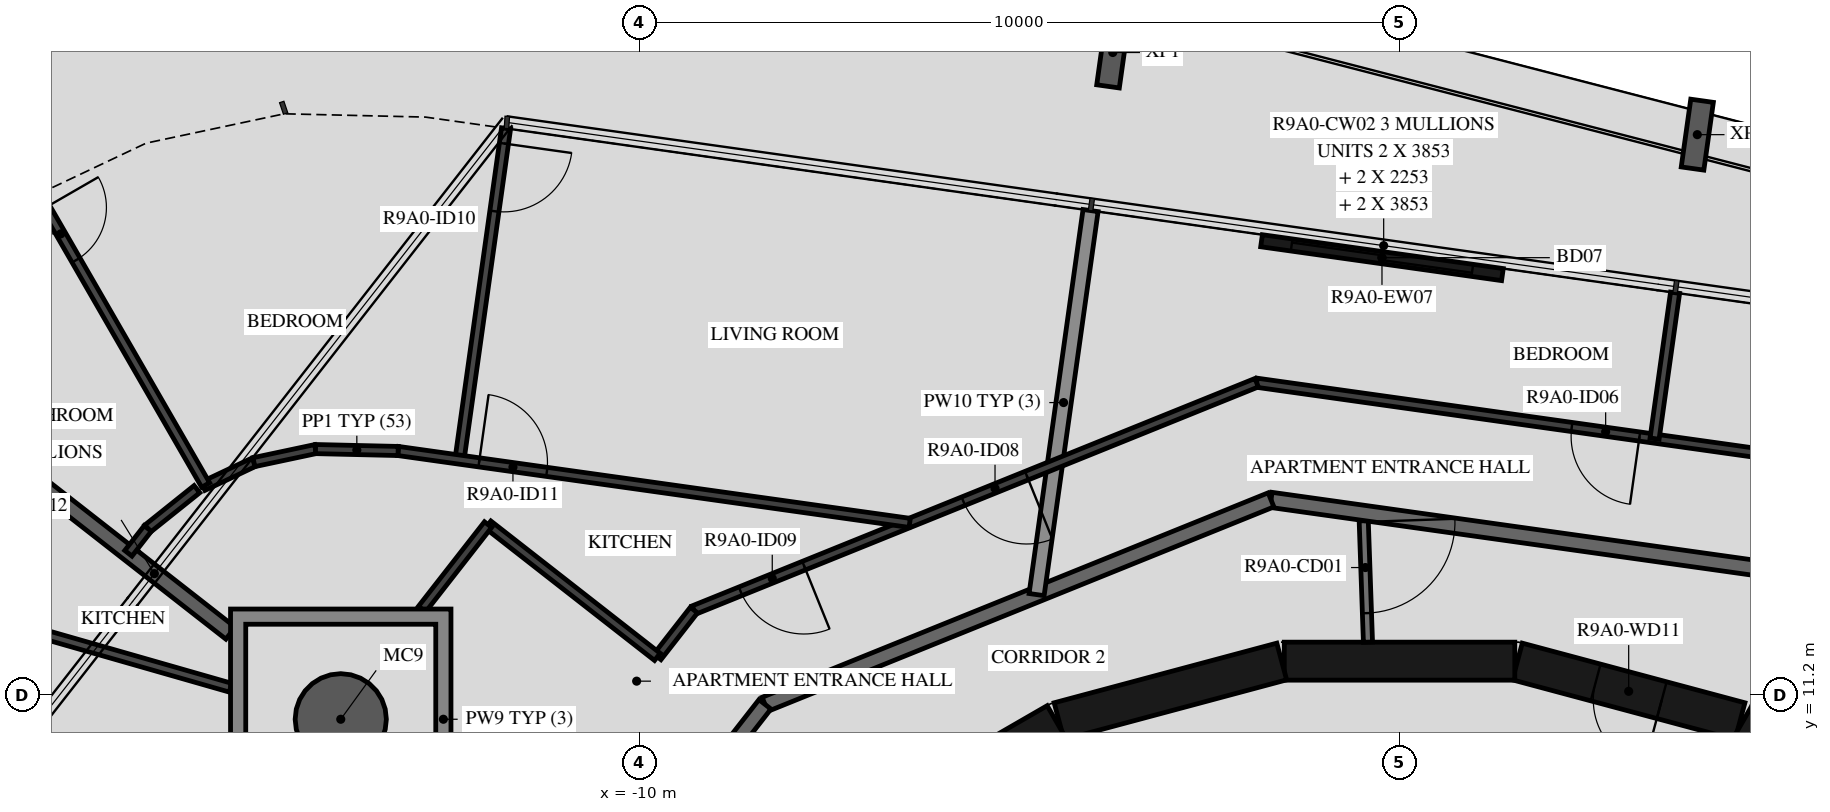
"""IFC4 building model, lengths in metres.
Left out: names, types, materials, properties, quantities, classifications, styles, units other than length and angle.
Written with IfcOpenShell. Run it as: python <this file> out.ifc"""

import sys

from ifc_helpers import new_model, si_unit, direction, frame, frame_2d, origin, origin_2d, place, context, subcontext, project, spatial, polyline, rectangle, hollow_circle, i_section, outline, extrude, element, fill, save


model = new_model("IFC4")
c1 = context("Model", 3, precision=1e-05, world=origin(), true_north=direction((0.0, 1.0)))
c2 = subcontext(c1, "Body", "Model", "MODEL_VIEW")
j1 = project(units=[si_unit("LENGTHUNIT", "METRE"), si_unit("PLANEANGLEUNIT", "RADIAN")], contexts=[c1])
p1 = place(None, origin())
s1 = spatial("IfcSite", under=j1, at=p1, CompositionType="ELEMENT")
p2 = place(p1, origin())
s2 = spatial("IfcBuilding", under=s1, at=p2, CompositionType="ELEMENT")
p3 = place(p2, frame((0.0, 0.0, 333.0)))
s3 = spatial("IfcBuildingStorey", under=s2, at=p3, CompositionType="ELEMENT", Elevation=333.0)
p4 = place(p3, frame((-13.929, 10.883, -0.45), z_axis=(0.0, 0.0, 1.0), x_axis=(1.0, 0.0, 0.0)))
e1 = element("IfcColumn", 1, at=p4, inside=s3, PredefinedType="COLUMN", context=c2, shape_type="SweptSolid", body=[
    extrude(hollow_circle(Radius=0.6, WallThickness=0.03, at=origin_2d()), origin(), (0.0, 0.0, 1.0), 3.57),
])
for number, where, z_axis, x_axis in (
    (2, (3.917, 18.574, -0.45), (0.0, 0.0, 1.0), (0.99, -0.139, 0.0)),
    (3, (-3.773, 19.655, -0.45), (0.0, 0.0, 1.0), (0.99, -0.139, 0.0)),
):
    element("IfcColumn", number, at=place(p3, frame(where, z_axis=z_axis, x_axis=x_axis)), inside=s3, PredefinedType="COLUMN", context=c2, shape_type="SweptSolid", body=[
        extrude(i_section(OverallWidth=0.3, OverallDepth=0.9, WebThickness=0.019, FlangeThickness=0.035, FilletRadius=0.03, at=origin_2d()), origin(), (0.0, 0.0, 1.0), 3.57),
    ])
p5 = place(p3, frame((1.354, 16.733, 0.0), z_axis=(0.0, 0.0, 1.0), x_axis=(-0.990270382149, 0.139156639217, 0.0)))
e4 = element("IfcWall", 4, at=p5, inside=s3, PredefinedType="STANDARD", context=c2, shape_type="SweptSolid", body=[
    extrude(rectangle(XDim=3.2, YDim=0.16, at=frame_2d((1.6, 0.0))), origin(), (0.0, 0.0, 1.0), 3.12),
])
p6 = place(p5, frame((0.4, 0.0, 0.0)))
e5 = element("IfcOpeningElement", 5, at=p6, cuts=e4, PredefinedType="OPENING", context=c2, shape_type="SweptSolid", body=[
    extrude(rectangle(XDim=2.4, YDim=2.4, at=frame_2d((1.2, 1.2))), frame((0.0, 0.09, 0.0), z_axis=(0.0, -1.0, 0.0), x_axis=(1.0, 0.0, 0.0)), (0.0, 0.0, 1.0), 0.18),
])
p7 = place(p3, frame((7.137, 9.329, 0.0), z_axis=(0.0, 0.0, 1.0), x_axis=(-0.865975092491, 0.500087131594, 0.0)))
e6 = element("IfcWall", 6, at=p7, inside=s3, PredefinedType="SHEAR", context=c2, shape_type="SweptSolid", body=[
    extrude(rectangle(XDim=3.033, YDim=0.5, at=frame_2d((1.516, 0.0))), origin(), (0.0, 0.0, 1.0), 3.12),
])
p8 = place(p3, frame((4.479, 10.858, 0.0), z_axis=(0.0, 0.0, 1.0), x_axis=(-0.965948410781, 0.258734743916, 0.0)))
e7 = element("IfcWall", 7, at=p8, inside=s3, PredefinedType="SHEAR", context=c2, shape_type="SweptSolid", body=[
    extrude(rectangle(XDim=3.033, YDim=0.5, at=frame_2d((1.516, 0.0))), origin(), (0.0, 0.0, 1.0), 3.12),
])
p9 = place(p8, frame((1.066, 0.0, 0.0)))
e8 = element("IfcOpeningElement", 8, at=p9, cuts=e7, PredefinedType="OPENING", context=c2, shape_type="SweptSolid", body=[
    extrude(rectangle(XDim=0.9, YDim=2.1, at=frame_2d((0.45, 1.05))), frame((0.0, 0.26, 0.0), z_axis=(0.0, -1.0, 0.0), x_axis=(1.0, 0.0, 0.0)), (0.0, 0.0, 1.0), 0.52),
])
for number, where, z_axis, x_axis in (
    (9, (1.516, 11.647, 0.0), (0.0, 0.0, 1.0), (-1.0, 0.0, 0.0)),
    (10, (-1.55, 11.643, 0.0), (0.0, 0.0, 1.0), (-0.966, -0.259, 0.0)),
    (11, (-4.51, 10.845, 0.0), (0.0, 0.0, 1.0), (-0.866, -0.5, 0.0)),
):
    element("IfcWall", number, at=place(p3, frame(where, z_axis=z_axis, x_axis=x_axis)), inside=s3, PredefinedType="SHEAR", context=c2, shape_type="SweptSolid", body=[
        extrude(rectangle(XDim=3.033, YDim=0.5, at=frame_2d((1.516, 0.0))), origin(), (0.0, 0.0, 1.0), 3.12),
    ])
p10 = place(p3, frame((-0.475, 13.598, 0.0), z_axis=(0.0, 0.0, 1.0), x_axis=(0.034852521429, -0.999392466326, 0.0)))
e12 = element("IfcWall", 12, at=p10, inside=s3, PredefinedType="PARTITIONING", context=c2, shape_type="SweptSolid", body=[
    extrude(rectangle(XDim=1.702, YDim=0.12, at=frame_2d((0.851, 0.0))), origin(), (0.0, 0.0, 1.0), 3.12),
])
p11 = place(p10, frame((0.12, 0.0, 0.0)))
e13 = element("IfcOpeningElement", 13, at=p11, cuts=e12, PredefinedType="OPENING", context=c2, shape_type="SweptSolid", body=[
    extrude(rectangle(XDim=1.2, YDim=2.1, at=frame_2d((0.6, 1.05))), frame((0.0, 0.07, 0.0), z_axis=(0.0, -1.0, 0.0), x_axis=(1.0, 0.0, 0.0)), (0.0, 0.0, 1.0), 0.14),
])
p12 = place(p3, frame((5.42, 12.77, 0.0), z_axis=(0.0, 0.0, 1.0), x_axis=(-0.990270565508, 0.139155334385, 0.0)))
e14 = element("IfcWall", 14, at=p12, inside=s3, PredefinedType="STANDARD", context=c2, shape_type="SweptSolid", body=[
    extrude(rectangle(XDim=7.181, YDim=0.2, at=frame_2d((3.59, 0.0))), origin(), (0.0, 0.0, 1.0), 3.12),
])
p13 = place(p3, frame((-1.691, 13.769, 0.0), z_axis=(0.0, 0.0, 1.0), x_axis=(-0.92717916932, -0.374618189599, 0.0)))
e15 = element("IfcWall", 15, at=p13, inside=s3, PredefinedType="STANDARD", context=c2, shape_type="SweptSolid", body=[
    extrude(rectangle(XDim=7.181, YDim=0.2, at=frame_2d((3.591, 0.0))), origin(), (0.0, 0.0, 1.0), 3.12),
])
p14 = place(p3, frame((-8.349, 11.079, 0.0), z_axis=(0.0, 0.0, 1.0), x_axis=(-0.615669112324, -0.78800478687, 0.0)))
e16 = element("IfcWall", 16, at=p14, inside=s3, PredefinedType="STANDARD", context=c2, shape_type="SweptSolid", body=[
    extrude(rectangle(XDim=7.181, YDim=0.2, at=frame_2d((3.591, 0.0))), origin(), (0.0, 0.0, 1.0), 3.12),
])
p15 = place(p14, frame((2.1, 0.0, 0.0)))
e17 = element("IfcOpeningElement", 17, at=p15, cuts=e16, PredefinedType="OPENING", context=c2, shape_type="SweptSolid", body=[
    extrude(rectangle(XDim=1.0, YDim=2.1, at=frame_2d((0.5, 1.05))), frame((0.0, 0.11, 0.0), z_axis=(0.0, -1.0, 0.0), x_axis=(1.0, 0.0, 0.0)), (0.0, 0.0, 1.0), 0.22),
])
p16 = place(p14, frame((3.811, 0.0, 0.0)))
e18 = element("IfcOpeningElement", 18, at=p16, cuts=e16, PredefinedType="OPENING", context=c2, shape_type="SweptSolid", body=[
    extrude(rectangle(XDim=1.0, YDim=2.1, at=frame_2d((0.5, 1.05))), frame((0.0, 0.11, 0.0), z_axis=(0.0, -1.0, 0.0), x_axis=(1.0, 0.0, 0.0)), (0.0, 0.0, 1.0), 0.22),
])
p17 = place(p3, frame((-4.065, 17.575, 0.0), z_axis=(0.0, 0.0, 1.0), x_axis=(-0.139163175955, -0.990269463559, 0.0)))
e19 = element("IfcWall", 19, at=p17, inside=s3, PredefinedType="STANDARD", context=c2, shape_type="SweptSolid", body=[
    extrude(rectangle(XDim=5.102, YDim=0.2, at=frame_2d((2.551, 0.0))), origin(), (0.0, 0.0, 1.0), 2.73),
])
p18 = place(p3, frame((-20.191, 15.775, 0.0), z_axis=(0.0, 0.0, 1.0), x_axis=(0.788021948923, -0.615647145706, 0.0)))
e20 = element("IfcWall", 20, at=p18, inside=s3, PredefinedType="STANDARD", context=c2, shape_type="SweptSolid", body=[
    extrude(rectangle(XDim=6.106, YDim=0.2, at=frame_2d((3.053, 0.0))), origin(), (0.0, 0.0, 1.0), 3.12),
])
p19 = place(p3, frame((6.027, 14.199, 0.0), z_axis=(0.0, 0.0, 1.0), x_axis=(-0.990271593532, 0.139148018469, 0.0)))
e21 = element("IfcWall", 21, at=p19, inside=s3, PredefinedType="PARTITIONING", context=c2, shape_type="SweptSolid", body=[
    extrude(rectangle(XDim=7.985, YDim=0.12, at=frame_2d((3.992, 0.0))), origin(), (0.0, 0.0, 1.0), 3.12),
])
p20 = place(p19, frame((2.898, 0.0, 0.0)))
e22 = element("IfcOpeningElement", 22, at=p20, cuts=e21, PredefinedType="OPENING", context=c2, shape_type="SweptSolid", body=[
    extrude(rectangle(XDim=0.9, YDim=2.1, at=frame_2d((0.45, 1.05))), frame((0.0, 0.07, 0.0), z_axis=(0.0, -1.0, 0.0), x_axis=(1.0, 0.0, 0.0)), (0.0, 0.0, 1.0), 0.14),
])
p21 = place(p3, frame((-1.88, 15.311, 0.0), z_axis=(0.0, 0.0, 1.0), x_axis=(-0.927184866592, -0.374604088557, 0.0)))
e23 = element("IfcWall", 23, at=p21, inside=s3, PredefinedType="PARTITIONING", context=c2, shape_type="SweptSolid", body=[
    extrude(rectangle(XDim=7.985, YDim=0.12, at=frame_2d((3.993, 0.0))), origin(), (0.0, 0.0, 1.0), 3.12),
])
p22 = place(p21, frame((3.262, 0.0, 0.0)))
e24 = element("IfcOpeningElement", 24, at=p22, cuts=e23, PredefinedType="OPENING", context=c2, shape_type="SweptSolid", body=[
    extrude(rectangle(XDim=0.9, YDim=2.1, at=frame_2d((0.45, 1.05))), frame((0.0, 0.07, 0.0), z_axis=(0.0, -1.0, 0.0), x_axis=(1.0, 0.0, 0.0)), (0.0, 0.0, 1.0), 0.14),
])
p23 = place(p21, frame((6.423, 0.0, 0.0)))
e25 = element("IfcOpeningElement", 25, at=p23, cuts=e23, PredefinedType="OPENING", context=c2, shape_type="SweptSolid", body=[
    extrude(rectangle(XDim=0.9, YDim=2.1, at=frame_2d((0.45, 1.05))), frame((0.0, 0.07, 0.0), z_axis=(0.0, -1.0, 0.0), x_axis=(1.0, 0.0, 0.0)), (0.0, 0.0, 1.0), 0.14),
])
p24 = place(p3, frame((3.625, 16.494, 0.0), z_axis=(0.0, 0.0, 1.0), x_axis=(-0.139181494832, -0.990266889023, 0.0)))
e26 = element("IfcWall", 26, at=p24, inside=s3, PredefinedType="PARTITIONING", context=c2, shape_type="SweptSolid", body=[
    extrude(rectangle(XDim=1.938, YDim=0.12, at=frame_2d((0.969, 0.0))), origin(), (0.0, 0.0, 1.0), 2.73),
])
p25 = place(p3, frame((-9.283, 12.319, 0.0), z_axis=(0.0, 0.0, 1.0), x_axis=(-0.615735018346, -0.787953289975, 0.0)))
e27 = element("IfcWall", 27, at=p25, inside=s3, PredefinedType="PARTITIONING", context=c2, shape_type="SweptSolid", body=[
    extrude(rectangle(XDim=0.781, YDim=0.12, at=frame_2d((0.391, 0.0))), origin(), (0.0, 0.0, 1.0), 3.12),
])
p26 = place(p3, frame((-9.764, 11.704, 0.0), z_axis=(0.0, 0.0, 1.0), x_axis=(-0.787996873396, 0.615679240772, 0.0)))
e28 = element("IfcWall", 28, at=p26, inside=s3, PredefinedType="PARTITIONING", context=c2, shape_type="SweptSolid", body=[
    extrude(rectangle(XDim=2.826, YDim=0.12, at=frame_2d((1.413, 0.0))), origin(), (0.0, 0.0, 1.0), 3.12),
])
p27 = place(p3, frame((-11.992, 13.444, 0.0), z_axis=(0.0, 0.0, 1.0), x_axis=(-0.615593635541, -0.788063751153, 0.0)))
e29 = element("IfcWall", 29, at=p27, inside=s3, PredefinedType="PARTITIONING", context=c2, shape_type="SweptSolid", body=[
    extrude(rectangle(XDim=1.41, YDim=0.12, at=frame_2d((0.705, 0.0))), origin(), (0.0, 0.0, 1.0), 3.12),
])
p28 = place(p3, frame((-11.755, 18.656, 0.0), z_axis=(0.0, 0.0, 1.0), x_axis=(-0.13916046232, -0.990269844904, 0.0)))
e30 = element("IfcWall", 30, at=p28, inside=s3, PredefinedType="PARTITIONING", context=c2, shape_type="SweptSolid", body=[
    extrude(rectangle(XDim=4.4, YDim=0.12, at=frame_2d((2.2, 0.0))), origin(), (0.0, 0.0, 1.0), 2.73),
])
p29 = place(p28, frame((0.2, 0.0, 0.0)))
e31 = element("IfcOpeningElement", 31, at=p29, cuts=e30, PredefinedType="OPENING", context=c2, shape_type="SweptSolid", body=[
    extrude(rectangle(XDim=0.9, YDim=2.1, at=frame_2d((0.45, 1.05))), frame((0.0, 0.07, 0.0), z_axis=(0.0, -1.0, 0.0), x_axis=(1.0, 0.0, 0.0)), (0.0, 0.0, 1.0), 0.14),
])
p30 = place(p3, frame((-13.175, 14.412, 0.0), z_axis=(0.0, 0.0, 1.0), x_axis=(0.990264549393, -0.139198140128, 0.0)))
e32 = element("IfcWall", 32, at=p30, inside=s3, PredefinedType="PARTITIONING", context=c2, shape_type="SweptSolid", body=[
    extrude(rectangle(XDim=6.796, YDim=0.12, at=frame_2d((3.398, 0.0))), origin(), (0.0, 0.0, 1.0), 3.12),
])
p31 = place(p30, frame((1.075, 0.0, 0.0)))
e33 = element("IfcOpeningElement", 33, at=p31, cuts=e32, PredefinedType="OPENING", context=c2, shape_type="SweptSolid", body=[
    extrude(rectangle(XDim=0.9, YDim=2.1, at=frame_2d((0.45, 1.05))), frame((0.0, 0.07, 0.0), z_axis=(0.0, -1.0, 0.0), x_axis=(1.0, 0.0, 0.0)), (0.0, 0.0, 1.0), 0.14),
])
p32 = place(p3, frame((-15.743, 13.948, 0.0), z_axis=(0.0, 0.0, 1.0), x_axis=(0.903885078158, 0.427775368019, 0.0)))
e34 = element("IfcWall", 34, at=p32, inside=s3, PredefinedType="PARTITIONING", context=c2, shape_type="SweptSolid", body=[
    extrude(rectangle(XDim=0.742, YDim=0.12, at=frame_2d((0.371, 0.0))), origin(), (0.0, 0.0, 1.0), 3.12),
])
p33 = place(p3, frame((-15.072, 14.265, 0.0), z_axis=(0.0, 0.0, 1.0), x_axis=(0.978141630921, 0.207939774595, 0.0)))
e35 = element("IfcWall", 35, at=p33, inside=s3, PredefinedType="PARTITIONING", context=c2, shape_type="SweptSolid", body=[
    extrude(rectangle(XDim=0.829, YDim=0.12, at=frame_2d((0.415, 0.0))), origin(), (0.0, 0.0, 1.0), 3.12),
])
p34 = place(p3, frame((-14.261, 14.438, 0.0), z_axis=(0.0, 0.0, 1.0), x_axis=(0.999732237365, -0.023139869764, 0.0)))
e36 = element("IfcWall", 36, at=p34, inside=s3, PredefinedType="PARTITIONING", context=c2, shape_type="SweptSolid", body=[
    extrude(rectangle(XDim=1.087, YDim=0.12, at=frame_2d((0.543, 0.0))), origin(), (0.0, 0.0, 1.0), 3.12),
])
p35 = place(p3, frame((-17.912, 17.789, 0.0), z_axis=(0.0, 0.0, 1.0), x_axis=(0.499601164034, -0.866255549417, 0.0)))
e37 = element("IfcWall", 37, at=p35, inside=s3, PredefinedType="PARTITIONING", context=c2, shape_type="SweptSolid", body=[
    extrude(rectangle(XDim=4.415, YDim=0.12, at=frame_2d((2.207, 0.0))), origin(), (0.0, 0.0, 1.0), 2.73),
])
p36 = place(p35, frame((0.2, 0.0, 0.0)))
e38 = element("IfcOpeningElement", 38, at=p36, cuts=e37, PredefinedType="OPENING", context=c2, shape_type="SweptSolid", body=[
    extrude(rectangle(XDim=0.8, YDim=2.1, at=frame_2d((0.4, 1.05))), frame((0.0, 0.07, 0.0), z_axis=(0.0, -1.0, 0.0), x_axis=(1.0, 0.0, 0.0)), (0.0, 0.0, 1.0), 0.14),
])
p37 = place(p3, frame((-15.821, 13.91, 0.0), z_axis=(0.0, 0.0, 1.0), x_axis=(-0.780840072472, -0.624730967074, 0.0)))
e39 = element("IfcWall", 39, at=p37, inside=s3, PredefinedType="PARTITIONING", context=c2, shape_type="SweptSolid", body=[
    extrude(rectangle(XDim=0.829, YDim=0.12, at=frame_2d((0.415, 0.0))), origin(), (0.0, 0.0, 1.0), 3.12),
])
p38 = place(p3, frame((-16.469, 13.393, 0.0), z_axis=(0.0, 0.0, 1.0), x_axis=(-0.615815563257, -0.787890342656, 0.0)))
e40 = element("IfcWall", 40, at=p38, inside=s3, PredefinedType="PARTITIONING", context=c2, shape_type="SweptSolid", body=[
    extrude(rectangle(XDim=0.414, YDim=0.12, at=frame_2d((0.207, 0.0))), origin(), (0.0, 0.0, 1.0), 3.12),
])
p39 = place(p3, frame((-21.594, 13.077, 0.0), z_axis=(0.0, 0.0, 1.0), x_axis=(0.961389857774, -0.275190009576, 0.0)))
e41 = element("IfcWall", 41, at=p39, inside=s3, PredefinedType="PARTITIONING", context=c2, shape_type="SweptSolid", body=[
    extrude(rectangle(XDim=6.464, YDim=0.12, at=frame_2d((3.232, 0.0))), origin(), (0.0, 0.0, 1.0), 2.73),
])
p40 = place(p39, frame((0.2, 0.0, 0.0)))
e42 = element("IfcOpeningElement", 42, at=p40, cuts=e41, PredefinedType="OPENING", context=c2, shape_type="SweptSolid", body=[
    extrude(rectangle(XDim=0.9, YDim=2.1, at=frame_2d((0.45, 1.05))), frame((0.0, 0.07, 0.0), z_axis=(0.0, -1.0, 0.0), x_axis=(1.0, 0.0, 0.0)), (0.0, 0.0, 1.0), 0.14),
])
p41 = place(p3, origin())
e43 = element("IfcWall", 43, at=p41, inside=s3, PredefinedType="STANDARD", context=c2, shape_type="SweptSolid", body=[
    extrude(outline(polyline([(-12.479, 12.333), (-12.479, 9.433), (-15.379, 9.433), (-15.379, 12.333), (-12.479, 12.333)]), holes=[polyline([(-15.179, 9.633), (-12.679, 9.633), (-12.679, 12.133), (-15.179, 12.133), (-15.179, 9.633)])]), origin(), (0.0, 0.0, 1.0), 3.12),
])
p42 = place(p6, origin())
e44 = element("IfcDoor", 44, at=p42, inside=s3, OperationType="DOUBLE_DOOR_SLIDING", PredefinedType="DOOR", context=c2, shape_type="SweptSolid", body=[
    extrude(rectangle(XDim=2.4, YDim=2.4, at=frame_2d((1.2, 1.2))), frame((0.0, 0.025, 0.0), z_axis=(0.0, -1.0, 0.0), x_axis=(1.0, 0.0, 0.0)), (0.0, 0.0, 1.0), 0.05),
])
fill(e5, e44)
p43 = place(p9, origin())
e45 = element("IfcDoor", 45, at=p43, inside=s3, OperationType="SINGLE_SWING_LEFT", PredefinedType="DOOR", context=c2, shape_type="SweptSolid", body=[
    extrude(rectangle(XDim=0.9, YDim=2.1, at=frame_2d((0.45, 1.05))), frame((0.0, 0.025, 0.0), z_axis=(0.0, -1.0, 0.0), x_axis=(1.0, 0.0, 0.0)), (0.0, 0.0, 1.0), 0.05),
])
fill(e8, e45)
p44 = place(p20, origin())
e46 = element("IfcDoor", 46, at=p44, inside=s3, OperationType="SINGLE_SWING_LEFT", PredefinedType="DOOR", context=c2, shape_type="SweptSolid", body=[
    extrude(rectangle(XDim=0.9, YDim=2.1, at=frame_2d((0.45, 1.05))), frame((0.0, 0.025, 0.0), z_axis=(0.0, -1.0, 0.0), x_axis=(1.0, 0.0, 0.0)), (0.0, 0.0, 1.0), 0.05),
])
fill(e22, e46)
p45 = place(p22, origin())
e47 = element("IfcDoor", 47, at=p45, inside=s3, OperationType="SINGLE_SWING_RIGHT", PredefinedType="DOOR", context=c2, shape_type="SweptSolid", body=[
    extrude(rectangle(XDim=0.9, YDim=2.1, at=frame_2d((0.45, 1.05))), frame((0.0, 0.025, 0.0), z_axis=(0.0, -1.0, 0.0), x_axis=(1.0, 0.0, 0.0)), (0.0, 0.0, 1.0), 0.05),
])
fill(e24, e47)
p46 = place(p23, origin())
e48 = element("IfcDoor", 48, at=p46, inside=s3, OperationType="SINGLE_SWING_RIGHT", PredefinedType="DOOR", context=c2, shape_type="SweptSolid", body=[
    extrude(rectangle(XDim=0.9, YDim=2.1, at=frame_2d((0.45, 1.05))), frame((0.0, 0.025, 0.0), z_axis=(0.0, -1.0, 0.0), x_axis=(1.0, 0.0, 0.0)), (0.0, 0.0, 1.0), 0.05),
])
fill(e25, e48)
p47 = place(p29, origin())
e49 = element("IfcDoor", 49, at=p47, inside=s3, OperationType="SINGLE_SWING_RIGHT", PredefinedType="DOOR", context=c2, shape_type="SweptSolid", body=[
    extrude(rectangle(XDim=0.9, YDim=2.1, at=frame_2d((0.45, 1.05))), frame((0.0, 0.025, 0.0), z_axis=(0.0, -1.0, 0.0), x_axis=(1.0, 0.0, 0.0)), (0.0, 0.0, 1.0), 0.05),
])
fill(e31, e49)
p48 = place(p36, origin())
e50 = element("IfcDoor", 50, at=p48, inside=s3, OperationType="SINGLE_SWING_RIGHT", PredefinedType="DOOR", context=c2, shape_type="SweptSolid", body=[
    extrude(rectangle(XDim=0.8, YDim=2.1, at=frame_2d((0.4, 1.05))), frame((0.0, 0.025, 0.0), z_axis=(0.0, -1.0, 0.0), x_axis=(1.0, 0.0, 0.0)), (0.0, 0.0, 1.0), 0.05),
])
fill(e38, e50)
p49 = place(p31, origin())
e51 = element("IfcDoor", 51, at=p49, inside=s3, OperationType="SINGLE_SWING_LEFT", PredefinedType="DOOR", context=c2, shape_type="SweptSolid", body=[
    extrude(rectangle(XDim=0.9, YDim=2.1, at=frame_2d((0.45, 1.05))), frame((0.0, 0.025, 0.0), z_axis=(0.0, -1.0, 0.0), x_axis=(1.0, 0.0, 0.0)), (0.0, 0.0, 1.0), 0.05),
])
fill(e33, e51)
p50 = place(p11, origin())
e52 = element("IfcDoor", 52, at=p50, inside=s3, OperationType="DOUBLE_DOOR_SINGLE_SWING", PredefinedType="DOOR", context=c2, shape_type="SweptSolid", body=[
    extrude(rectangle(XDim=1.2, YDim=2.1, at=frame_2d((0.6, 1.05))), frame((0.0, 0.025, 0.0), z_axis=(0.0, -1.0, 0.0), x_axis=(1.0, 0.0, 0.0)), (0.0, 0.0, 1.0), 0.05),
])
fill(e13, e52)
save(model, sys.argv[1])
